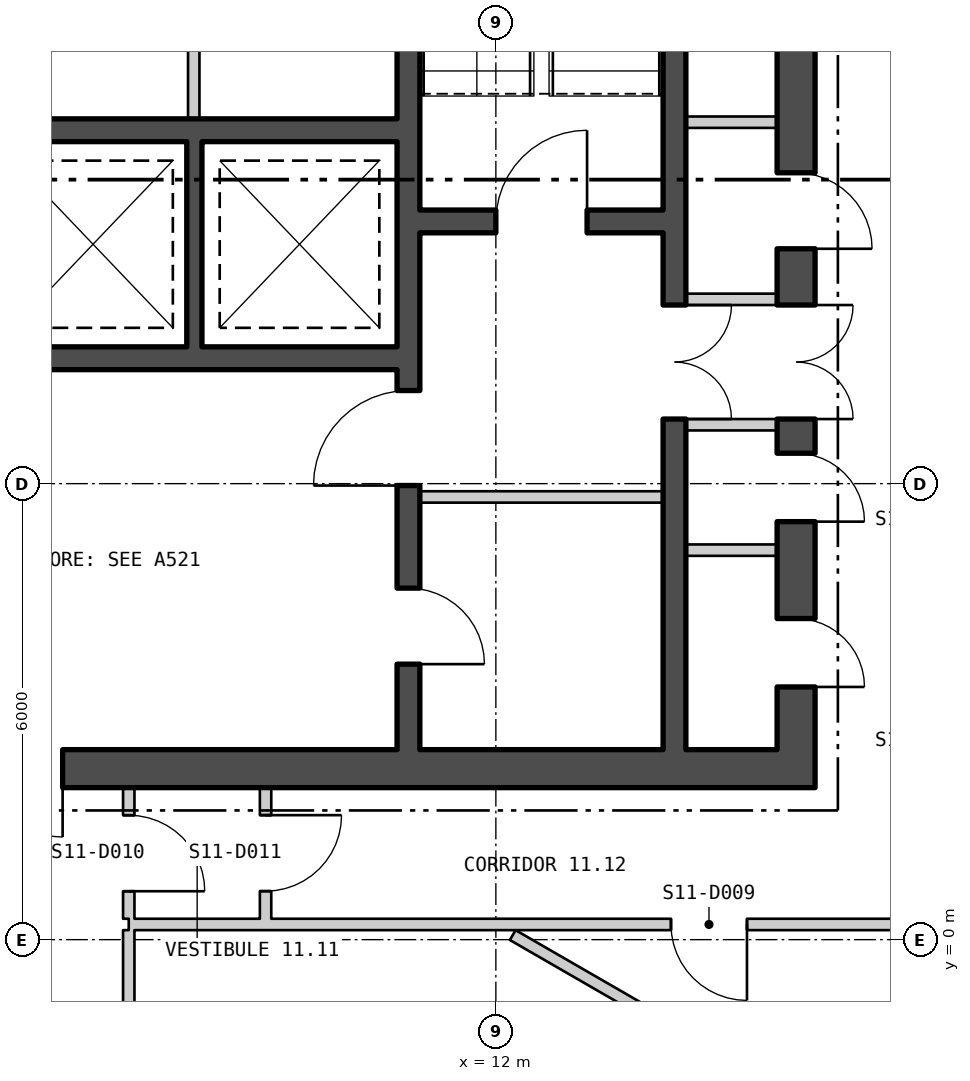
"""IFC4 building model, lengths in metres.
Left out: names, types, materials, properties, quantities, classifications, styles, units other than length and angle.
Written with IfcOpenShell. Run it as: python <this file> out.ifc"""

import sys

from ifc_helpers import new_model, si_unit, direction, frame, frame_2d, origin, place, context, subcontext, project, spatial, polyline, rectangle, outline, extrude, element, fill, save


model = new_model("IFC4")
c1 = context("Model", 3, precision=1e-05, world=origin(), true_north=direction((0.0, 1.0)))
c2 = subcontext(c1, "Body", "Model", "MODEL_VIEW")
j1 = project(units=[si_unit("LENGTHUNIT", "METRE"), si_unit("PLANEANGLEUNIT", "RADIAN")], contexts=[c1])
p1 = place(None, origin())
s1 = spatial("IfcSite", under=j1, at=p1, CompositionType="ELEMENT")
p2 = place(p1, origin())
s2 = spatial("IfcBuilding", under=s1, at=p2, CompositionType="ELEMENT")
p3 = place(p2, frame((0.0, 0.0, 151.5)))
s3 = spatial("IfcBuildingStorey", under=s2, at=p3, CompositionType="ELEMENT", Elevation=151.5)
p4 = place(p3, frame((4.21, -26.921, -0.18), z_axis=(0.0, 0.0, 1.0), x_axis=(0.500000141277, 0.866025322218, 0.0)))
e1 = element("IfcWall", 1, at=p4, inside=s3, PredefinedType="SOLIDWALL", context=c2, shape_type="SweptSolid", body=[
    extrude(outline(polyline([(-0.13, -0.225), (45.86, -0.225), (45.6, 0.225), (0.13, 0.225), (-0.13, -0.225)])), origin(), (0.0, 0.0, 1.0), 3.68),
])
p5 = place(p4, frame((1.424, 0.0, 1.08)))
e2 = element("IfcOpeningElement", 2, at=p5, cuts=e1, PredefinedType="OPENING", context=c2, shape_type="SweptSolid", body=[
    extrude(rectangle(XDim=2.4, YDim=2.0, at=frame_2d((1.2, 1.0))), frame((0.0, 0.235, 0.0), z_axis=(0.0, -1.0, 0.0), x_axis=(1.0, 0.0, 0.0)), (0.0, 0.0, 1.0), 0.47),
])
p6 = place(p4, frame((5.892, 0.0, 1.08)))
e3 = element("IfcOpeningElement", 3, at=p6, cuts=e1, PredefinedType="OPENING", context=c2, shape_type="SweptSolid", body=[
    extrude(rectangle(XDim=2.4, YDim=2.0, at=frame_2d((1.2, 1.0))), frame((0.0, 0.235, 0.0), z_axis=(0.0, -1.0, 0.0), x_axis=(1.0, 0.0, 0.0)), (0.0, 0.0, 1.0), 0.47),
])
p7 = place(p4, frame((10.399, 0.0, 1.08)))
e4 = element("IfcOpeningElement", 4, at=p7, cuts=e1, PredefinedType="OPENING", context=c2, shape_type="SweptSolid", body=[
    extrude(rectangle(XDim=2.4, YDim=2.0, at=frame_2d((1.2, 1.0))), frame((0.0, 0.235, 0.0), z_axis=(0.0, -1.0, 0.0), x_axis=(1.0, 0.0, 0.0)), (0.0, 0.0, 1.0), 0.47),
])
p8 = place(p4, frame((14.905, 0.0, 1.08)))
e5 = element("IfcOpeningElement", 5, at=p8, cuts=e1, PredefinedType="OPENING", context=c2, shape_type="SweptSolid", body=[
    extrude(rectangle(XDim=2.4, YDim=2.0, at=frame_2d((1.2, 1.0))), frame((0.0, 0.235, 0.0), z_axis=(0.0, -1.0, 0.0), x_axis=(1.0, 0.0, 0.0)), (0.0, 0.0, 1.0), 0.47),
])
p9 = place(p4, frame((19.412, 0.0, 1.08)))
e6 = element("IfcOpeningElement", 6, at=p9, cuts=e1, PredefinedType="OPENING", context=c2, shape_type="SweptSolid", body=[
    extrude(rectangle(XDim=2.4, YDim=2.0, at=frame_2d((1.2, 1.0))), frame((0.0, 0.235, 0.0), z_axis=(0.0, -1.0, 0.0), x_axis=(1.0, 0.0, 0.0)), (0.0, 0.0, 1.0), 0.47),
])
p10 = place(p4, frame((23.918, 0.0, 1.08)))
e7 = element("IfcOpeningElement", 7, at=p10, cuts=e1, PredefinedType="OPENING", context=c2, shape_type="SweptSolid", body=[
    extrude(rectangle(XDim=2.4, YDim=2.0, at=frame_2d((1.2, 1.0))), frame((0.0, 0.235, 0.0), z_axis=(0.0, -1.0, 0.0), x_axis=(1.0, 0.0, 0.0)), (0.0, 0.0, 1.0), 0.47),
])
p11 = place(p4, frame((37.438, 0.0, 1.08)))
e8 = element("IfcOpeningElement", 8, at=p11, cuts=e1, PredefinedType="OPENING", context=c2, shape_type="SweptSolid", body=[
    extrude(rectangle(XDim=2.4, YDim=2.0, at=frame_2d((1.2, 1.0))), frame((0.0, 0.235, 0.0), z_axis=(0.0, -1.0, 0.0), x_axis=(1.0, 0.0, 0.0)), (0.0, 0.0, 1.0), 0.47),
])
p12 = place(p4, frame((41.907, 0.0, 1.08)))
e9 = element("IfcOpeningElement", 9, at=p12, cuts=e1, PredefinedType="OPENING", context=c2, shape_type="SweptSolid", body=[
    extrude(rectangle(XDim=2.4, YDim=2.0, at=frame_2d((1.2, 1.0))), frame((0.0, 0.235, 0.0), z_axis=(0.0, -1.0, 0.0), x_axis=(1.0, 0.0, 0.0)), (0.0, 0.0, 1.0), 0.47),
])
p13 = place(p3, frame((-16.2, 2.25, 0.0), z_axis=(0.0, 0.0, 1.0), x_axis=(1.0, 0.0, 0.0)))
e10 = element("IfcWall", 10, at=p13, inside=s3, PredefinedType="SHEAR", context=c2, shape_type="SweptSolid", body=[
    extrude(rectangle(XDim=32.4, YDim=0.5, at=frame_2d((16.2, 0.0))), origin(), (0.0, 0.0, 1.0), 3.7),
])
p14 = place(p13, frame((10.7, 0.0, 0.0)))
e11 = element("IfcOpeningElement", 11, at=p14, cuts=e10, PredefinedType="OPENING", context=c2, shape_type="SweptSolid", body=[
    extrude(rectangle(XDim=1.8, YDim=2.4, at=frame_2d((0.9, 1.2))), frame((0.0, 0.26, 0.0), z_axis=(0.0, -1.0, 0.0), x_axis=(1.0, 0.0, 0.0)), (0.0, 0.0, 1.0), 0.52),
])
p15 = place(p13, frame((20.7, 0.0, 0.0)))
e12 = element("IfcOpeningElement", 12, at=p15, cuts=e10, PredefinedType="OPENING", context=c2, shape_type="SweptSolid", body=[
    extrude(rectangle(XDim=1.8, YDim=2.4, at=frame_2d((0.9, 1.2))), frame((0.0, 0.26, 0.0), z_axis=(0.0, -1.0, 0.0), x_axis=(1.0, 0.0, 0.0)), (0.0, 0.0, 1.0), 0.52),
])
p16 = place(p3, frame((15.95, 2.5, 0.0), z_axis=(0.0, 0.0, 1.0), x_axis=(0.0, 1.0, 0.0)))
e13 = element("IfcWall", 13, at=p16, inside=s3, PredefinedType="SHEAR", context=c2, shape_type="SweptSolid", body=[
    extrude(rectangle(XDim=15.0, YDim=0.5, at=frame_2d((7.5, 0.0))), origin(), (0.0, 0.0, 1.0), 3.7),
])
p17 = place(p16, frame((4.35, 0.0, 0.0)))
e14 = element("IfcOpeningElement", 14, at=p17, cuts=e13, PredefinedType="OPENING", context=c2, shape_type="SweptSolid", body=[
    extrude(rectangle(XDim=1.5, YDim=2.1, at=frame_2d((0.75, 1.05))), frame((0.0, 0.26, 0.0), z_axis=(0.0, -1.0, 0.0), x_axis=(1.0, 0.0, 0.0)), (0.0, 0.0, 1.0), 0.52),
])
p18 = place(p16, frame((0.825, 0.0, 0.0)))
e15 = element("IfcOpeningElement", 15, at=p18, cuts=e13, PredefinedType="OPENING", context=c2, shape_type="SweptSolid", body=[
    extrude(rectangle(XDim=0.9, YDim=2.1, at=frame_2d((0.45, 1.05))), frame((0.0, 0.26, 0.0), z_axis=(0.0, -1.0, 0.0), x_axis=(1.0, 0.0, 0.0)), (0.0, 0.0, 1.0), 0.52),
])
p19 = place(p16, frame((3.0, 0.0, 0.0)))
e16 = element("IfcOpeningElement", 16, at=p19, cuts=e13, PredefinedType="OPENING", context=c2, shape_type="SweptSolid", body=[
    extrude(rectangle(XDim=0.9, YDim=2.1, at=frame_2d((0.45, 1.05))), frame((0.0, 0.26, 0.0), z_axis=(0.0, -1.0, 0.0), x_axis=(1.0, 0.0, 0.0)), (0.0, 0.0, 1.0), 0.52),
])
p20 = place(p16, frame((6.59, 0.0, 0.0)))
e17 = element("IfcOpeningElement", 17, at=p20, cuts=e13, PredefinedType="OPENING", context=c2, shape_type="SweptSolid", body=[
    extrude(rectangle(XDim=1.0, YDim=2.1, at=frame_2d((0.5, 1.05))), frame((0.0, 0.26, 0.0), z_axis=(0.0, -1.0, 0.0), x_axis=(1.0, 0.0, 0.0)), (0.0, 0.0, 1.0), 0.52),
])
p21 = place(p16, frame((11.215, 0.0, 0.0)))
e18 = element("IfcOpeningElement", 18, at=p21, cuts=e13, PredefinedType="OPENING", context=c2, shape_type="SweptSolid", body=[
    extrude(rectangle(XDim=0.9, YDim=2.1, at=frame_2d((0.45, 1.05))), frame((0.0, 0.26, 0.0), z_axis=(0.0, -1.0, 0.0), x_axis=(1.0, 0.0, 0.0)), (0.0, 0.0, 1.0), 0.52),
])
p22 = place(p3, frame((10.85, 2.5, 0.0), z_axis=(0.0, 0.0, 1.0), x_axis=(0.0, 1.0, 0.0)))
e19 = element("IfcWall", 19, at=p22, inside=s3, PredefinedType="SHEAR", context=c2, shape_type="SweptSolid", body=[
    extrude(rectangle(XDim=15.0, YDim=0.3, at=frame_2d((7.5, 0.0))), origin(), (0.0, 0.0, 1.0), 3.7),
])
p23 = place(p22, frame((3.475, 0.0, 0.0)))
e20 = element("IfcOpeningElement", 20, at=p23, cuts=e19, PredefinedType="OPENING", context=c2, shape_type="SweptSolid", body=[
    extrude(rectangle(XDim=1.25, YDim=2.1, at=frame_2d((0.625, 1.05))), frame((0.0, 0.16, 0.0), z_axis=(0.0, -1.0, 0.0), x_axis=(1.0, 0.0, 0.0)), (0.0, 0.0, 1.0), 0.32),
])
p24 = place(p22, frame((1.125, 0.0, 0.0)))
e21 = element("IfcOpeningElement", 21, at=p24, cuts=e19, PredefinedType="OPENING", context=c2, shape_type="SweptSolid", body=[
    extrude(rectangle(XDim=1.0, YDim=2.1, at=frame_2d((0.5, 1.05))), frame((0.0, 0.16, 0.0), z_axis=(0.0, -1.0, 0.0), x_axis=(1.0, 0.0, 0.0)), (0.0, 0.0, 1.0), 0.32),
])
p25 = place(p3, frame((14.35, 2.5, 0.0), z_axis=(0.0, 0.0, 1.0), x_axis=(0.0, 1.0, 0.0)))
e22 = element("IfcWall", 22, at=p25, inside=s3, PredefinedType="SHEAR", context=c2, shape_type="SweptSolid", body=[
    extrude(rectangle(XDim=15.0, YDim=0.3, at=frame_2d((7.5, 0.0))), origin(), (0.0, 0.0, 1.0), 3.7),
])
p26 = place(p25, frame((4.35, 0.0, 0.0)))
e23 = element("IfcOpeningElement", 23, at=p26, cuts=e22, PredefinedType="OPENING", context=c2, shape_type="SweptSolid", body=[
    extrude(rectangle(XDim=1.5, YDim=2.1, at=frame_2d((0.75, 1.05))), frame((0.0, 0.16, 0.0), z_axis=(0.0, -1.0, 0.0), x_axis=(1.0, 0.0, 0.0)), (0.0, 0.0, 1.0), 0.32),
])
p27 = place(p3, frame((11.0, 9.45, 0.0), z_axis=(0.0, 0.0, 1.0), x_axis=(1.0, 0.0, 0.0)))
e24 = element("IfcWall", 24, at=p27, inside=s3, PredefinedType="SHEAR", context=c2, shape_type="SweptSolid", body=[
    extrude(rectangle(XDim=3.2, YDim=0.3, at=frame_2d((1.6, 0.0))), origin(), (0.0, 0.0, 1.0), 3.7),
])
p28 = place(p27, frame((1.0, 0.0, 0.0)))
e25 = element("IfcOpeningElement", 25, at=p28, cuts=e24, PredefinedType="OPENING", context=c2, shape_type="SweptSolid", body=[
    extrude(rectangle(XDim=1.2, YDim=2.1, at=frame_2d((0.6, 1.05))), frame((0.0, 0.16, 0.0), z_axis=(0.0, -1.0, 0.0), x_axis=(1.0, 0.0, 0.0)), (0.0, 0.0, 1.0), 0.32),
])
p29 = place(p3, frame((2.6, 10.65, 0.0), z_axis=(0.0, 0.0, 1.0), x_axis=(1.0, 0.0, 0.0)))
e26 = element("IfcWall", 26, at=p29, inside=s3, PredefinedType="SHEAR", context=c2, shape_type="SweptSolid", body=[
    extrude(rectangle(XDim=8.1, YDim=0.3, at=frame_2d((4.05, 0.0))), origin(), (0.0, 0.0, 1.0), 3.7),
])
p30 = place(p29, frame((0.933, 0.0, 0.0)))
e27 = element("IfcOpeningElement", 27, at=p30, cuts=e26, PredefinedType="OPENING", context=c2, shape_type="SweptSolid", body=[
    extrude(rectangle(XDim=1.0, YDim=2.1, at=frame_2d((0.5, 1.05))), frame((0.0, 0.16, 0.0), z_axis=(0.0, -1.0, 0.0), x_axis=(1.0, 0.0, 0.0)), (0.0, 0.0, 1.0), 0.32),
])
p31 = place(p3, frame((2.6, 7.65, 0.0), z_axis=(0.0, 0.0, 1.0), x_axis=(1.0, 0.0, 0.0)))
e28 = element("IfcWall", 28, at=p31, inside=s3, PredefinedType="SHEAR", context=c2, shape_type="SweptSolid", body=[
    extrude(rectangle(XDim=8.1, YDim=0.3, at=frame_2d((4.05, 0.0))), origin(), (0.0, 0.0, 1.0), 3.7),
])
p32 = place(p3, frame((8.033, 7.8, 0.0), z_axis=(0.0, 0.0, 1.0), x_axis=(0.0, 1.0, 0.0)))
e29 = element("IfcWall", 29, at=p32, inside=s3, PredefinedType="SHEAR", context=c2, shape_type="SweptSolid", body=[
    extrude(rectangle(XDim=2.7, YDim=0.2, at=frame_2d((1.35, 0.0))), origin(), (0.0, 0.0, 1.0), 3.7),
])
p33 = place(p3, frame((8.025, 10.8, 0.0), z_axis=(0.0, 0.0, 1.0), x_axis=(0.0, 1.0, 0.0)))
e30 = element("IfcWall", 30, at=p33, inside=s3, PredefinedType="PARTITIONING", context=c2, shape_type="SweptSolid", body=[
    extrude(rectangle(XDim=3.6, YDim=0.15, at=frame_2d((1.8, 0.0))), origin(), (0.0, 0.0, 1.0), 3.7),
])
p34 = place(p33, frame((1.175, 0.0, 0.0)))
e31 = element("IfcOpeningElement", 31, at=p34, cuts=e30, PredefinedType="OPENING", context=c2, shape_type="SweptSolid", body=[
    extrude(rectangle(XDim=1.25, YDim=2.1, at=frame_2d((0.625, 1.05))), frame((0.0, 0.085, 0.0), z_axis=(0.0, -1.0, 0.0), x_axis=(1.0, 0.0, 0.0)), (0.0, 0.0, 1.0), 0.17),
])
p35 = place(p3, frame((11.0, 5.825, 0.0), z_axis=(0.0, 0.0, 1.0), x_axis=(1.0, 0.0, 0.0)))
e32 = element("IfcWall", 32, at=p35, inside=s3, PredefinedType="PARTITIONING", context=c2, shape_type="SweptSolid", body=[
    extrude(rectangle(XDim=3.2, YDim=0.15, at=frame_2d((1.6, 0.0))), origin(), (0.0, 0.0, 1.0), 3.7),
])
for number, where, z_axis, x_axis in (
    (33, (14.5, 6.775, 0.0), (0.0, 0.0, 1.0), (1.0, 0.0, 0.0)),
    (34, (14.5, 8.425, 0.0), (0.0, 0.0, 1.0), (1.0, 0.0, 0.0)),
    (35, (14.5, 5.125, 0.0), (0.0, 0.0, 1.0), (1.0, 0.0, 0.0)),
    (36, (14.5, 10.756, 0.0), (0.0, 0.0, 1.0), (1.0, 0.0, 0.0)),
):
    element("IfcWall", number, at=place(p3, frame(where, z_axis=z_axis, x_axis=x_axis)), inside=s3, PredefinedType="PARTITIONING", context=c2, shape_type="SweptSolid", body=[
        extrude(rectangle(XDim=1.2, YDim=0.15, at=frame_2d((0.6, 0.0))), origin(), (0.0, 0.0, 1.0), 3.7),
    ])
p36 = place(p3, frame((7.17, -1.125, 0.0), z_axis=(0.0, 0.0, 1.0), x_axis=(0.0, 1.0, 0.0)))
e37 = element("IfcWall", 37, at=p36, inside=s3, PredefinedType="PARTITIONING", context=c2, shape_type="SweptSolid", body=[
    extrude(rectangle(XDim=1.25, YDim=0.15, at=frame_2d((0.625, 0.0))), origin(), (0.0, 0.0, 1.0), 3.7),
])
p37 = place(p3, frame((7.17, 0.2, 0.0), z_axis=(0.0, 0.0, 1.0), x_axis=(1.0, 0.0, 0.0)))
e38 = element("IfcWall", 38, at=p37, inside=s3, PredefinedType="PARTITIONING", context=c2, shape_type="SweptSolid", body=[
    extrude(rectangle(XDim=10.755, YDim=0.15, at=frame_2d((5.378, 0.0))), origin(), (0.0, 0.0, 1.0), 3.7),
])
p38 = place(p37, frame((7.134, 0.0, 0.0)))
e39 = element("IfcOpeningElement", 39, at=p38, cuts=e38, PredefinedType="OPENING", context=c2, shape_type="SweptSolid", body=[
    extrude(rectangle(XDim=1.0, YDim=2.1, at=frame_2d((0.5, 1.05))), frame((0.0, 0.085, 0.0), z_axis=(0.0, -1.0, 0.0), x_axis=(1.0, 0.0, 0.0)), (0.0, 0.0, 1.0), 0.17),
])
p39 = place(p3, frame((7.17, 0.275, 0.0), z_axis=(0.0, 0.0, 1.0), x_axis=(0.0, 1.0, 0.0)))
e40 = element("IfcWall", 40, at=p39, inside=s3, PredefinedType="PARTITIONING", context=c2, shape_type="SweptSolid", body=[
    extrude(rectangle(XDim=1.725, YDim=0.15, at=frame_2d((0.863, 0.0))), origin(), (0.0, 0.0, 1.0), 3.7),
])
p40 = place(p39, frame((0.362, 0.0, 0.0)))
e41 = element("IfcOpeningElement", 41, at=p40, cuts=e40, PredefinedType="OPENING", context=c2, shape_type="SweptSolid", body=[
    extrude(rectangle(XDim=1.0, YDim=2.1, at=frame_2d((0.5, 1.05))), frame((0.0, 0.085, 0.0), z_axis=(0.0, -1.0, 0.0), x_axis=(1.0, 0.0, 0.0)), (0.0, 0.0, 1.0), 0.17),
])
p41 = place(p3, frame((8.97, 0.275, 0.0), z_axis=(0.0, 0.0, 1.0), x_axis=(0.0, 1.0, 0.0)))
e42 = element("IfcWall", 42, at=p41, inside=s3, PredefinedType="PARTITIONING", context=c2, shape_type="SweptSolid", body=[
    extrude(rectangle(XDim=1.725, YDim=0.15, at=frame_2d((0.863, 0.0))), origin(), (0.0, 0.0, 1.0), 3.7),
])
p42 = place(p41, frame((0.363, 0.0, 0.0)))
e43 = element("IfcOpeningElement", 43, at=p42, cuts=e42, PredefinedType="OPENING", context=c2, shape_type="SweptSolid", body=[
    extrude(rectangle(XDim=1.0, YDim=2.1, at=frame_2d((0.5, 1.05))), frame((0.0, 0.085, 0.0), z_axis=(0.0, -1.0, 0.0), x_axis=(1.0, 0.0, 0.0)), (0.0, 0.0, 1.0), 0.17),
])
p43 = place(p3, frame((12.222, 0.06, 0.0), z_axis=(0.0, 0.0, 1.0), x_axis=(0.866077922096, -0.499909024581, 0.0)))
e44 = element("IfcWall", 44, at=p43, inside=s3, PredefinedType="PARTITIONING", context=c2, shape_type="SweptSolid", body=[
    extrude(rectangle(XDim=5.877, YDim=0.15, at=frame_2d((2.939, 0.0))), origin(), (0.0, 0.0, 1.0), 3.7),
])
p44 = place(p28, origin())
e45 = element("IfcDoor", 45, at=p44, inside=s3, OperationType="SINGLE_SWING_LEFT", PredefinedType="DOOR", context=c2, shape_type="SweptSolid", body=[
    extrude(rectangle(XDim=1.2, YDim=2.1, at=frame_2d((0.6, 1.05))), frame((0.0, 0.025, 0.0), z_axis=(0.0, -1.0, 0.0), x_axis=(1.0, 0.0, 0.0)), (0.0, 0.0, 1.0), 0.05),
])
fill(e25, e45)
p45 = place(p23, origin())
e46 = element("IfcDoor", 46, at=p45, inside=s3, OperationType="SINGLE_SWING_RIGHT", PredefinedType="DOOR", context=c2, shape_type="SweptSolid", body=[
    extrude(rectangle(XDim=1.25, YDim=2.1, at=frame_2d((0.625, 1.05))), frame((0.0, 0.025, 0.0), z_axis=(0.0, -1.0, 0.0), x_axis=(1.0, 0.0, 0.0)), (0.0, 0.0, 1.0), 0.05),
])
fill(e20, e46)
p46 = place(p24, origin())
e47 = element("IfcDoor", 47, at=p46, inside=s3, OperationType="SINGLE_SWING_LEFT", PredefinedType="DOOR", context=c2, shape_type="SweptSolid", body=[
    extrude(rectangle(XDim=1.0, YDim=2.1, at=frame_2d((0.5, 1.05))), frame((0.0, 0.025, 0.0), z_axis=(0.0, -1.0, 0.0), x_axis=(1.0, 0.0, 0.0)), (0.0, 0.0, 1.0), 0.05),
])
fill(e21, e47)
p47 = place(p26, origin())
e48 = element("IfcDoor", 48, at=p47, inside=s3, OperationType="DOUBLE_DOOR_SINGLE_SWING", PredefinedType="DOOR", context=c2, shape_type="SweptSolid", body=[
    extrude(rectangle(XDim=1.5, YDim=2.1, at=frame_2d((0.75, 1.05))), frame((0.0, 0.025, 0.0), z_axis=(0.0, -1.0, 0.0), x_axis=(1.0, 0.0, 0.0)), (0.0, 0.0, 1.0), 0.05),
])
fill(e23, e48)
p48 = place(p17, origin())
e49 = element("IfcDoor", 49, at=p48, inside=s3, OperationType="DOUBLE_DOOR_SINGLE_SWING", PredefinedType="DOOR", context=c2, shape_type="SweptSolid", body=[
    extrude(rectangle(XDim=1.5, YDim=2.1, at=frame_2d((0.75, 1.05))), frame((0.0, 0.025, 0.0), z_axis=(0.0, -1.0, 0.0), x_axis=(1.0, 0.0, 0.0)), (0.0, 0.0, 1.0), 0.05),
])
fill(e14, e49)
p49 = place(p18, origin())
e50 = element("IfcDoor", 50, at=p49, inside=s3, OperationType="SINGLE_SWING_LEFT", PredefinedType="DOOR", context=c2, shape_type="SweptSolid", body=[
    extrude(rectangle(XDim=0.9, YDim=2.1, at=frame_2d((0.45, 1.05))), frame((0.0, 0.025, 0.0), z_axis=(0.0, -1.0, 0.0), x_axis=(1.0, 0.0, 0.0)), (0.0, 0.0, 1.0), 0.05),
])
fill(e15, e50)
p50 = place(p19, origin())
e51 = element("IfcDoor", 51, at=p50, inside=s3, OperationType="SINGLE_SWING_LEFT", PredefinedType="DOOR", context=c2, shape_type="SweptSolid", body=[
    extrude(rectangle(XDim=0.9, YDim=2.1, at=frame_2d((0.45, 1.05))), frame((0.0, 0.025, 0.0), z_axis=(0.0, -1.0, 0.0), x_axis=(1.0, 0.0, 0.0)), (0.0, 0.0, 1.0), 0.05),
])
fill(e16, e51)
p51 = place(p20, origin())
e52 = element("IfcDoor", 52, at=p51, inside=s3, OperationType="SINGLE_SWING_LEFT", PredefinedType="DOOR", context=c2, shape_type="SweptSolid", body=[
    extrude(rectangle(XDim=1.0, YDim=2.1, at=frame_2d((0.5, 1.05))), frame((0.0, 0.025, 0.0), z_axis=(0.0, -1.0, 0.0), x_axis=(1.0, 0.0, 0.0)), (0.0, 0.0, 1.0), 0.05),
])
fill(e17, e52)
p52 = place(p15, origin())
e53 = element("IfcDoor", 53, at=p52, inside=s3, OperationType="DOUBLE_DOOR_SINGLE_SWING", PredefinedType="DOOR", context=c2, shape_type="SweptSolid", body=[
    extrude(rectangle(XDim=1.8, YDim=2.4, at=frame_2d((0.9, 1.2))), frame((0.0, 0.025, 0.0), z_axis=(0.0, -1.0, 0.0), x_axis=(1.0, 0.0, 0.0)), (0.0, 0.0, 1.0), 0.05),
])
fill(e12, e53)
p53 = place(p38, origin())
e54 = element("IfcDoor", 54, at=p53, inside=s3, OperationType="SINGLE_SWING_RIGHT", PredefinedType="DOOR", context=c2, shape_type="SweptSolid", body=[
    extrude(rectangle(XDim=1.0, YDim=2.1, at=frame_2d((0.5, 1.05))), frame((0.0, 0.025, 0.0), z_axis=(0.0, -1.0, 0.0), x_axis=(1.0, 0.0, 0.0)), (0.0, 0.0, 1.0), 0.05),
])
fill(e39, e54)
p54 = place(p40, origin())
e55 = element("IfcDoor", 55, at=p54, inside=s3, OperationType="SINGLE_SWING_LEFT", PredefinedType="DOOR", context=c2, shape_type="SweptSolid", body=[
    extrude(rectangle(XDim=1.0, YDim=2.1, at=frame_2d((0.5, 1.05))), frame((0.0, 0.025, 0.0), z_axis=(0.0, -1.0, 0.0), x_axis=(1.0, 0.0, 0.0)), (0.0, 0.0, 1.0), 0.05),
])
fill(e41, e55)
p55 = place(p42, origin())
e56 = element("IfcDoor", 56, at=p55, inside=s3, OperationType="SINGLE_SWING_RIGHT", PredefinedType="DOOR", context=c2, shape_type="SweptSolid", body=[
    extrude(rectangle(XDim=1.0, YDim=2.1, at=frame_2d((0.5, 1.05))), frame((0.0, 0.025, 0.0), z_axis=(0.0, -1.0, 0.0), x_axis=(1.0, 0.0, 0.0)), (0.0, 0.0, 1.0), 0.05),
])
fill(e43, e56)
save(model, sys.argv[1])
